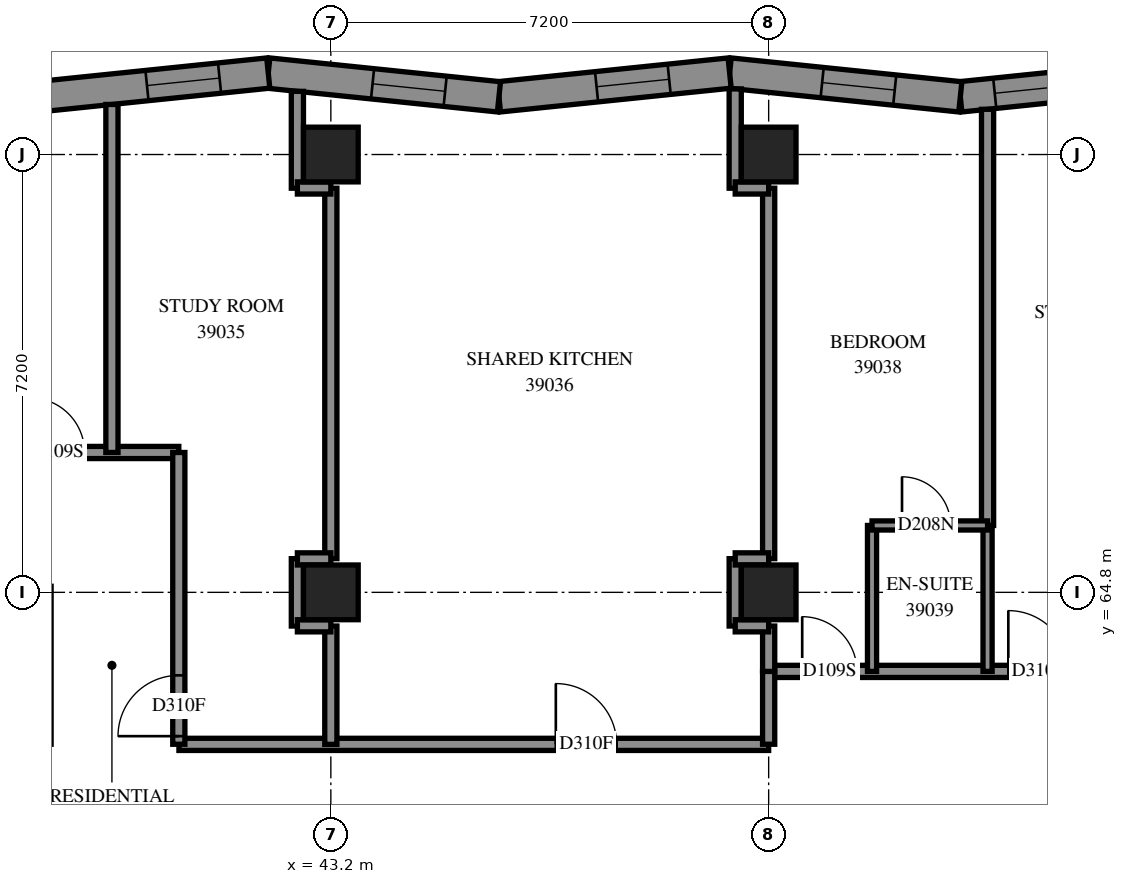
"""IFC4 building model, lengths in metres.
Left out: names, types, materials, properties, quantities, classifications, styles, units other than length and angle.
Written with IfcOpenShell. Run it as: python <this file> out.ifc"""

import sys

from ifc_helpers import new_model, si_unit, direction, frame, frame_2d, origin, origin_2d, place, context, subcontext, project, spatial, polyline, rectangle, outline, extrude, element, fill, save


model = new_model("IFC4")
c1 = context("Model", 3, precision=1e-05, world=origin(), true_north=direction((0.0, 1.0)))
c2 = subcontext(c1, "Body", "Model", "MODEL_VIEW")
j1 = project(units=[si_unit("LENGTHUNIT", "METRE"), si_unit("PLANEANGLEUNIT", "RADIAN")], contexts=[c1])
p1 = place(None, origin())
s1 = spatial("IfcSite", under=j1, at=p1, CompositionType="ELEMENT")
p2 = place(p1, origin())
s2 = spatial("IfcBuilding", under=s1, at=p2, CompositionType="ELEMENT")
p3 = place(p2, frame((0.0, 0.0, 145.6)))
s3 = spatial("IfcBuildingStorey", under=s2, at=p3, CompositionType="ELEMENT", Elevation=145.6)
for number, where, z_axis, x_axis in (
    (1, (43.2, 64.8, 0.0), (0.0, 0.0, 1.0), (1.0, 0.0, 0.0)),
    (2, (43.2, 72.0, 0.0), (0.0, 0.0, 1.0), (1.0, 0.0, 0.0)),
    (3, (50.4, 64.8, 0.0), (0.0, 0.0, 1.0), (1.0, 0.0, 0.0)),
    (4, (50.4, 72.0, 0.0), (0.0, 0.0, 1.0), (1.0, 0.0, 0.0)),
):
    element("IfcColumn", number, at=place(p3, frame(where, z_axis=z_axis, x_axis=x_axis)), inside=s3, PredefinedType="COLUMN", context=c2, shape_type="SweptSolid", body=[
        extrude(rectangle(XDim=0.9, YDim=0.9, at=origin_2d()), origin(), (0.0, 0.0, 1.0), 3.1),
    ])
p4 = place(p3, frame((57.346, 73.34, 0.0), z_axis=(0.0, 0.0, 1.0), x_axis=(-0.9947304076, -0.1025251975, 0.0)))
e5 = element("IfcWall", 5, at=p4, inside=s3, PredefinedType="SOLIDWALL", context=c2, shape_type="SweptSolid", body=[
    extrude(outline(polyline([(-0.026, -0.25), (3.788, -0.25), (3.84, 0.25), (0.026, 0.25), (-0.026, -0.25)])), origin(), (0.0, 0.0, 1.0), 3.1),
])
p5 = place(p4, frame((0.445, 0.0, 0.45)))
e6 = element("IfcOpeningElement", 6, at=p5, cuts=e5, PredefinedType="OPENING", context=c2, shape_type="SweptSolid", body=[
    extrude(rectangle(XDim=2.8, YDim=2.5, at=frame_2d((1.4, 1.25))), frame((0.0, 0.26, 0.0), z_axis=(0.0, -1.0, 0.0), x_axis=(1.0, 0.0, 0.0)), (0.0, 0.0, 1.0), 0.52),
])
p6 = place(p3, frame((53.552, 72.949, 0.0), z_axis=(0.0, 0.0, 1.0), x_axis=(-0.9947306832, 0.1025225234, 0.0)))
e7 = element("IfcWall", 7, at=p6, inside=s3, PredefinedType="SOLIDWALL", context=c2, shape_type="SweptSolid", body=[
    extrude(outline(polyline([(0.026, -0.25), (3.84, -0.25), (3.788, 0.25), (-0.026, 0.25), (0.026, -0.25)])), origin(), (0.0, 0.0, 1.0), 3.1),
])
p7 = place(p6, frame((1.084, 0.0, 0.45)))
e8 = element("IfcOpeningElement", 8, at=p7, cuts=e7, PredefinedType="OPENING", context=c2, shape_type="SweptSolid", body=[
    extrude(rectangle(XDim=1.2, YDim=2.5, at=frame_2d((0.6, 1.25))), frame((0.0, 0.26, 0.0), z_axis=(0.0, -1.0, 0.0), x_axis=(1.0, 0.0, 0.0)), (0.0, 0.0, 1.0), 0.52),
])
p8 = place(p3, frame((49.758, 73.34, 0.0), z_axis=(0.0, 0.0, 1.0), x_axis=(-0.9947306832, -0.1025225234, 0.0)))
e9 = element("IfcWall", 9, at=p8, inside=s3, PredefinedType="SOLIDWALL", context=c2, shape_type="SweptSolid", body=[
    extrude(outline(polyline([(-0.026, -0.25), (3.788, -0.25), (3.84, 0.25), (0.026, 0.25), (-0.026, -0.25)])), origin(), (0.0, 0.0, 1.0), 3.1),
])
p9 = place(p8, frame((1.0, 0.0, 0.45)))
e10 = element("IfcOpeningElement", 10, at=p9, cuts=e9, PredefinedType="OPENING", context=c2, shape_type="SweptSolid", body=[
    extrude(rectangle(XDim=1.2, YDim=2.5, at=frame_2d((0.6, 1.25))), frame((0.0, 0.26, 0.0), z_axis=(0.0, -1.0, 0.0), x_axis=(1.0, 0.0, 0.0)), (0.0, 0.0, 1.0), 0.52),
])
p10 = place(p3, frame((45.965, 72.949, 0.0), z_axis=(0.0, 0.0, 1.0), x_axis=(-0.9947304076, 0.1025251975, 0.0)))
e11 = element("IfcWall", 11, at=p10, inside=s3, PredefinedType="SOLIDWALL", context=c2, shape_type="SweptSolid", body=[
    extrude(outline(polyline([(0.026, -0.25), (3.84, -0.25), (3.788, 0.25), (-0.026, 0.25), (0.026, -0.25)])), origin(), (0.0, 0.0, 1.0), 3.1),
])
p11 = place(p10, frame((0.89, 0.0, 0.45)))
e12 = element("IfcOpeningElement", 12, at=p11, cuts=e11, PredefinedType="OPENING", context=c2, shape_type="SweptSolid", body=[
    extrude(rectangle(XDim=1.2, YDim=2.5, at=frame_2d((0.6, 1.25))), frame((0.0, 0.26, 0.0), z_axis=(0.0, -1.0, 0.0), x_axis=(1.0, 0.0, 0.0)), (0.0, 0.0, 1.0), 0.52),
])
p12 = place(p3, frame((42.171, 73.34, 0.0), z_axis=(0.0, 0.0, 1.0), x_axis=(-0.9947306832, -0.1025225234, 0.0)))
e13 = element("IfcWall", 13, at=p12, inside=s3, PredefinedType="SOLIDWALL", context=c2, shape_type="SweptSolid", body=[
    extrude(outline(polyline([(-0.026, -0.25), (3.788, -0.25), (3.84, 0.25), (0.026, 0.25), (-0.026, -0.25)])), origin(), (0.0, 0.0, 1.0), 3.1),
])
p13 = place(p12, frame((0.805, 0.0, 0.45)))
e14 = element("IfcOpeningElement", 14, at=p13, cuts=e13, PredefinedType="OPENING", context=c2, shape_type="SweptSolid", body=[
    extrude(rectangle(XDim=1.2, YDim=2.5, at=frame_2d((0.6, 1.25))), frame((0.0, 0.26, 0.0), z_axis=(0.0, -1.0, 0.0), x_axis=(1.0, 0.0, 0.0)), (0.0, 0.0, 1.0), 0.52),
])
p14 = place(p3, frame((21.602, 67.1, 0.0), z_axis=(0.0, 0.0, 1.0), x_axis=(1.0, 0.0, 0.0)))
e15 = element("IfcWall", 15, at=p14, inside=s3, PredefinedType="PARTITIONING", context=c2, shape_type="SweptSolid", body=[
    extrude(rectangle(XDim=19.098, YDim=0.2, at=frame_2d((9.549, 0.0))), origin(), (0.0, 0.0, 1.0), 3.1),
])
p15 = place(p14, frame((3.998, 0.0, 0.0)))
e16 = element("IfcOpeningElement", 16, at=p15, cuts=e15, PredefinedType="OPENING", context=c2, shape_type="SweptSolid", body=[
    extrude(rectangle(XDim=0.9, YDim=2.1, at=frame_2d((0.45, 1.05))), frame((0.0, 0.11, 0.0), z_axis=(0.0, -1.0, 0.0), x_axis=(1.0, 0.0, 0.0)), (0.0, 0.0, 1.0), 0.22),
])
p16 = place(p14, frame((11.399, 0.0, 0.0)))
e17 = element("IfcOpeningElement", 17, at=p16, cuts=e15, PredefinedType="OPENING", context=c2, shape_type="SweptSolid", body=[
    extrude(rectangle(XDim=0.9, YDim=2.1, at=frame_2d((0.45, 1.05))), frame((0.0, 0.11, 0.0), z_axis=(0.0, -1.0, 0.0), x_axis=(1.0, 0.0, 0.0)), (0.0, 0.0, 1.0), 0.22),
])
p17 = place(p14, frame((16.648, 0.0, 0.0)))
e18 = element("IfcOpeningElement", 18, at=p17, cuts=e15, PredefinedType="OPENING", context=c2, shape_type="SweptSolid", body=[
    extrude(rectangle(XDim=0.9, YDim=2.1, at=frame_2d((0.45, 1.05))), frame((0.0, 0.11, 0.0), z_axis=(0.0, -1.0, 0.0), x_axis=(1.0, 0.0, 0.0)), (0.0, 0.0, 1.0), 0.22),
])
p18 = place(p3, frame((40.702, 62.3, 0.0), z_axis=(0.0, 0.0, 1.0), x_axis=(1.0, 0.0, 0.0)))
e19 = element("IfcWall", 19, at=p18, inside=s3, PredefinedType="PARTITIONING", context=c2, shape_type="SweptSolid", body=[
    extrude(rectangle(XDim=9.698, YDim=0.2, at=frame_2d((4.849, 0.0))), origin(), (0.0, 0.0, 1.0), 3.1),
])
p19 = place(p18, frame((6.198, 0.0, 0.0)))
e20 = element("IfcOpeningElement", 20, at=p19, cuts=e19, PredefinedType="OPENING", context=c2, shape_type="SweptSolid", body=[
    extrude(rectangle(XDim=1.0, YDim=2.1, at=frame_2d((0.5, 1.05))), frame((0.0, 0.11, 0.0), z_axis=(0.0, -1.0, 0.0), x_axis=(1.0, 0.0, 0.0)), (0.0, 0.0, 1.0), 0.22),
])
p20 = place(p3, frame((54.0, 65.9, 0.0), z_axis=(0.0, 0.0, 1.0), x_axis=(0.0, 1.0, 0.0)))
e21 = element("IfcWall", 21, at=p20, inside=s3, PredefinedType="PARTITIONING", context=c2, shape_type="SweptSolid", body=[
    extrude(rectangle(XDim=6.843, YDim=0.2, at=frame_2d((3.422, 0.0))), origin(), (0.0, 0.0, 1.0), 3.1),
])
for number, where, z_axis, x_axis in (
    (22, (43.2, 65.354, 0.0), (0.0, 0.0, 1.0), (0.0, 1.0, 0.0)),
    (23, (50.4, 65.354, 0.0), (0.0, 0.0, 1.0), (0.0, 1.0, 0.0)),
):
    element("IfcWall", number, at=place(p3, frame(where, z_axis=z_axis, x_axis=x_axis)), inside=s3, PredefinedType="PARTITIONING", context=c2, shape_type="SweptSolid", body=[
        extrude(rectangle(XDim=6.092, YDim=0.2, at=frame_2d((3.046, 0.0))), origin(), (0.0, 0.0, 1.0), 3.1),
    ])
p21 = place(p3, frame((39.6, 67.1, 0.0), z_axis=(0.0, 0.0, 1.0), x_axis=(0.0, 1.0, 0.0)))
e24 = element("IfcWall", 24, at=p21, inside=s3, PredefinedType="PARTITIONING", context=c2, shape_type="SweptSolid", body=[
    extrude(rectangle(XDim=5.723, YDim=0.2, at=frame_2d((2.862, 0.0))), origin(), (0.0, 0.0, 1.0), 3.1),
])
p22 = place(p3, frame((50.4, 63.5, 0.0), z_axis=(0.0, 0.0, 1.0), x_axis=(1.0, 0.0, 0.0)))
e25 = element("IfcWall", 25, at=p22, inside=s3, PredefinedType="PARTITIONING", context=c2, shape_type="SweptSolid", body=[
    extrude(rectangle(XDim=5.1, YDim=0.2, at=frame_2d((2.55, 0.0))), origin(), (0.0, 0.0, 1.0), 3.1),
])
p23 = place(p22, frame((0.552, 0.0, 0.0)))
e26 = element("IfcOpeningElement", 26, at=p23, cuts=e25, PredefinedType="OPENING", context=c2, shape_type="SweptSolid", body=[
    extrude(rectangle(XDim=0.9, YDim=2.1, at=frame_2d((0.45, 1.05))), frame((0.0, 0.11, 0.0), z_axis=(0.0, -1.0, 0.0), x_axis=(1.0, 0.0, 0.0)), (0.0, 0.0, 1.0), 0.22),
])
p24 = place(p22, frame((3.941, 0.0, 0.0)))
e27 = element("IfcOpeningElement", 27, at=p24, cuts=e25, PredefinedType="OPENING", context=c2, shape_type="SweptSolid", body=[
    extrude(rectangle(XDim=1.0, YDim=2.1, at=frame_2d((0.5, 1.05))), frame((0.0, 0.11, 0.0), z_axis=(0.0, -1.0, 0.0), x_axis=(1.0, 0.0, 0.0)), (0.0, 0.0, 1.0), 0.22),
])
p25 = place(p3, frame((40.7, 62.302, 0.0), z_axis=(0.0, 0.0, 1.0), x_axis=(0.0, 1.0, 0.0)))
e28 = element("IfcWall", 28, at=p25, inside=s3, PredefinedType="PARTITIONING", context=c2, shape_type="SweptSolid", body=[
    extrude(rectangle(XDim=4.798, YDim=0.2, at=frame_2d((2.399, 0.0))), origin(), (0.0, 0.0, 1.0), 3.1),
])
p26 = place(p25, frame((0.133, 0.0, 0.0)))
e29 = element("IfcOpeningElement", 29, at=p26, cuts=e28, PredefinedType="OPENING", context=c2, shape_type="SweptSolid", body=[
    extrude(rectangle(XDim=1.0, YDim=2.1, at=frame_2d((0.5, 1.05))), frame((0.0, 0.11, 0.0), z_axis=(0.0, -1.0, 0.0), x_axis=(1.0, 0.0, 0.0)), (0.0, 0.0, 1.0), 0.22),
])
for number, where, z_axis, x_axis in (
    (30, (52.1, 63.5, 0.0), (0.0, 0.0, 1.0), (0.0, 1.0, 0.0)),
    (31, (54.0, 63.5, 0.0), (0.0, 0.0, 1.0), (0.0, 1.0, 0.0)),
):
    element("IfcWall", number, at=place(p3, frame(where, z_axis=z_axis, x_axis=x_axis)), inside=s3, PredefinedType="PARTITIONING", context=c2, shape_type="SweptSolid", body=[
        extrude(rectangle(XDim=2.4, YDim=0.15, at=frame_2d((1.2, 0.0))), origin(), (0.0, 0.0, 1.0), 3.1),
    ])
p27 = place(p3, frame((43.2, 62.3, 0.0), z_axis=(0.0, 0.0, 1.0), x_axis=(0.0, 1.0, 0.0)))
e32 = element("IfcWall", 32, at=p27, inside=s3, PredefinedType="PARTITIONING", context=c2, shape_type="SweptSolid", body=[
    extrude(rectangle(XDim=1.946, YDim=0.2, at=frame_2d((0.973, 0.0))), origin(), (0.0, 0.0, 1.0), 3.1),
])
p28 = place(p3, frame((52.1, 65.9, 0.0), z_axis=(0.0, 0.0, 1.0), x_axis=(1.0, 0.0, 0.0)))
e33 = element("IfcWall", 33, at=p28, inside=s3, PredefinedType="PARTITIONING", context=c2, shape_type="SweptSolid", body=[
    extrude(rectangle(XDim=1.9, YDim=0.15, at=frame_2d((0.95, 0.0))), origin(), (0.0, 0.0, 1.0), 3.1),
])
p29 = place(p28, frame((0.493, 0.0, 0.0)))
e34 = element("IfcOpeningElement", 34, at=p29, cuts=e33, PredefinedType="OPENING", context=c2, shape_type="SweptSolid", body=[
    extrude(rectangle(XDim=0.8, YDim=2.1, at=frame_2d((0.4, 1.05))), frame((0.0, 0.085, 0.0), z_axis=(0.0, -1.0, 0.0), x_axis=(1.0, 0.0, 0.0)), (0.0, 0.0, 1.0), 0.17),
])
p30 = place(p3, frame((49.85, 71.446, 0.0), z_axis=(0.0, 0.0, 1.0), x_axis=(0.0, 1.0, 0.0)))
e35 = element("IfcWall", 35, at=p30, inside=s3, PredefinedType="PARTITIONING", context=c2, shape_type="SweptSolid", body=[
    extrude(rectangle(XDim=1.633, YDim=0.2, at=frame_2d((0.817, 0.0))), origin(), (0.0, 0.0, 1.0), 3.1),
])
p31 = place(p3, frame((42.65, 71.446, 0.0), z_axis=(0.0, 0.0, 1.0), x_axis=(0.0, 1.0, 0.0)))
e36 = element("IfcWall", 36, at=p31, inside=s3, PredefinedType="PARTITIONING", context=c2, shape_type="SweptSolid", body=[
    extrude(rectangle(XDim=1.593, YDim=0.2, at=frame_2d((0.796, 0.0))), origin(), (0.0, 0.0, 1.0), 3.1),
])
p32 = place(p3, frame((50.4, 62.302, 0.0), z_axis=(0.0, 0.0, 1.0), x_axis=(0.0, 1.0, 0.0)))
e37 = element("IfcWall", 37, at=p32, inside=s3, PredefinedType="PARTITIONING", context=c2, shape_type="SweptSolid", body=[
    extrude(rectangle(XDim=1.198, YDim=0.2, at=frame_2d((0.599, 0.0))), origin(), (0.0, 0.0, 1.0), 3.1),
])
for number, where, z_axis, x_axis in (
    (38, (42.65, 64.246, 0.0), (0.0, 0.0, 1.0), (0.0, 1.0, 0.0)),
    (39, (49.85, 64.246, 0.0), (0.0, 0.0, 1.0), (0.0, 1.0, 0.0)),
):
    element("IfcWall", number, at=place(p3, frame(where, z_axis=z_axis, x_axis=x_axis)), inside=s3, PredefinedType="PARTITIONING", context=c2, shape_type="SweptSolid", body=[
        extrude(rectangle(XDim=1.108, YDim=0.2, at=frame_2d((0.554, 0.0))), origin(), (0.0, 0.0, 1.0), 3.1),
    ])
p33 = place(p3, frame((50.4, 63.5, 0.0), z_axis=(0.0, 0.0, 1.0), x_axis=(0.0, 1.0, 0.0)))
e40 = element("IfcWall", 40, at=p33, inside=s3, PredefinedType="PARTITIONING", context=c2, shape_type="SweptSolid", body=[
    extrude(rectangle(XDim=0.746, YDim=0.2, at=frame_2d((0.373, 0.0))), origin(), (0.0, 0.0, 1.0), 3.1),
])
for number, where, z_axis, x_axis in (
    (41, (42.65, 71.45, 0.0), (0.0, 0.0, 1.0), (1.0, 0.0, 0.0)),
    (42, (42.65, 65.35, 0.0), (0.0, 0.0, 1.0), (1.0, 0.0, 0.0)),
    (43, (42.65, 64.25, 0.0), (0.0, 0.0, 1.0), (1.0, 0.0, 0.0)),
    (44, (49.85, 71.45, 0.0), (0.0, 0.0, 1.0), (1.0, 0.0, 0.0)),
    (45, (49.85, 65.35, 0.0), (0.0, 0.0, 1.0), (1.0, 0.0, 0.0)),
    (46, (49.85, 64.25, 0.0), (0.0, 0.0, 1.0), (1.0, 0.0, 0.0)),
):
    element("IfcWall", number, at=place(p3, frame(where, z_axis=z_axis, x_axis=x_axis)), inside=s3, PredefinedType="PARTITIONING", context=c2, shape_type="SweptSolid", body=[
        extrude(rectangle(XDim=0.55, YDim=0.2, at=frame_2d((0.275, 0.0))), origin(), (0.0, 0.0, 1.0), 3.1),
    ])
p34 = place(p5, origin())
e47 = element("IfcWindow", 47, at=p34, inside=s3, PartitioningType="SINGLE_PANEL", PredefinedType="WINDOW", context=c2, shape_type="SweptSolid", body=[
    extrude(rectangle(XDim=2.8, YDim=2.5, at=frame_2d((1.4, 1.25))), frame((0.0, 0.18, 0.0), z_axis=(0.0, -1.0, 0.0), x_axis=(1.0, 0.0, 0.0)), (0.0, 0.0, 1.0), 0.06),
])
fill(e6, e47)
p35 = place(p7, origin())
e48 = element("IfcWindow", 48, at=p35, inside=s3, PartitioningType="SINGLE_PANEL", PredefinedType="WINDOW", context=c2, shape_type="SweptSolid", body=[
    extrude(rectangle(XDim=1.2, YDim=2.5, at=frame_2d((0.6, 1.25))), frame((0.0, 0.18, 0.0), z_axis=(0.0, -1.0, 0.0), x_axis=(1.0, 0.0, 0.0)), (0.0, 0.0, 1.0), 0.06),
])
fill(e8, e48)
p36 = place(p9, origin())
e49 = element("IfcWindow", 49, at=p36, inside=s3, PartitioningType="SINGLE_PANEL", PredefinedType="WINDOW", context=c2, shape_type="SweptSolid", body=[
    extrude(rectangle(XDim=1.2, YDim=2.5, at=frame_2d((0.6, 1.25))), frame((0.0, 0.18, 0.0), z_axis=(0.0, -1.0, 0.0), x_axis=(1.0, 0.0, 0.0)), (0.0, 0.0, 1.0), 0.06),
])
fill(e10, e49)
p37 = place(p11, origin())
e50 = element("IfcWindow", 50, at=p37, inside=s3, PartitioningType="SINGLE_PANEL", PredefinedType="WINDOW", context=c2, shape_type="SweptSolid", body=[
    extrude(rectangle(XDim=1.2, YDim=2.5, at=frame_2d((0.6, 1.25))), frame((0.0, 0.18, 0.0), z_axis=(0.0, -1.0, 0.0), x_axis=(1.0, 0.0, 0.0)), (0.0, 0.0, 1.0), 0.06),
])
fill(e12, e50)
p38 = place(p13, origin())
e51 = element("IfcWindow", 51, at=p38, inside=s3, PartitioningType="SINGLE_PANEL", PredefinedType="WINDOW", context=c2, shape_type="SweptSolid", body=[
    extrude(rectangle(XDim=1.2, YDim=2.5, at=frame_2d((0.6, 1.25))), frame((0.0, 0.18, 0.0), z_axis=(0.0, -1.0, 0.0), x_axis=(1.0, 0.0, 0.0)), (0.0, 0.0, 1.0), 0.06),
])
fill(e14, e51)
p39 = place(p17, origin())
e52 = element("IfcDoor", 52, at=p39, inside=s3, OperationType="SINGLE_SWING_RIGHT", PredefinedType="DOOR", context=c2, shape_type="SweptSolid", body=[
    extrude(rectangle(XDim=0.9, YDim=2.1, at=frame_2d((0.45, 1.05))), frame((0.0, 0.025, 0.0), z_axis=(0.0, -1.0, 0.0), x_axis=(1.0, 0.0, 0.0)), (0.0, 0.0, 1.0), 0.05),
])
fill(e18, e52)
p40 = place(p26, origin())
e53 = element("IfcDoor", 53, at=p40, inside=s3, OperationType="SINGLE_SWING_LEFT", PredefinedType="DOOR", context=c2, shape_type="SweptSolid", body=[
    extrude(rectangle(XDim=1.0, YDim=2.1, at=frame_2d((0.5, 1.05))), frame((0.0, 0.025, 0.0), z_axis=(0.0, -1.0, 0.0), x_axis=(1.0, 0.0, 0.0)), (0.0, 0.0, 1.0), 0.05),
])
fill(e29, e53)
p41 = place(p19, origin())
e54 = element("IfcDoor", 54, at=p41, inside=s3, OperationType="SINGLE_SWING_RIGHT", PredefinedType="DOOR", context=c2, shape_type="SweptSolid", body=[
    extrude(rectangle(XDim=1.0, YDim=2.1, at=frame_2d((0.5, 1.05))), frame((0.0, 0.025, 0.0), z_axis=(0.0, -1.0, 0.0), x_axis=(1.0, 0.0, 0.0)), (0.0, 0.0, 1.0), 0.05),
])
fill(e20, e54)
p42 = place(p23, origin())
e55 = element("IfcDoor", 55, at=p42, inside=s3, OperationType="SINGLE_SWING_RIGHT", PredefinedType="DOOR", context=c2, shape_type="SweptSolid", body=[
    extrude(rectangle(XDim=0.9, YDim=2.1, at=frame_2d((0.45, 1.05))), frame((0.0, 0.025, 0.0), z_axis=(0.0, -1.0, 0.0), x_axis=(1.0, 0.0, 0.0)), (0.0, 0.0, 1.0), 0.05),
])
fill(e26, e55)
p43 = place(p29, origin())
e56 = element("IfcDoor", 56, at=p43, inside=s3, OperationType="SINGLE_SWING_RIGHT", PredefinedType="DOOR", context=c2, shape_type="SweptSolid", body=[
    extrude(rectangle(XDim=0.8, YDim=2.1, at=frame_2d((0.4, 1.05))), frame((0.0, 0.025, 0.0), z_axis=(0.0, -1.0, 0.0), x_axis=(1.0, 0.0, 0.0)), (0.0, 0.0, 1.0), 0.05),
])
fill(e34, e56)
p44 = place(p24, origin())
e57 = element("IfcDoor", 57, at=p44, inside=s3, OperationType="SINGLE_SWING_LEFT", PredefinedType="DOOR", context=c2, shape_type="SweptSolid", body=[
    extrude(rectangle(XDim=1.0, YDim=2.1, at=frame_2d((0.5, 1.05))), frame((0.0, 0.025, 0.0), z_axis=(0.0, -1.0, 0.0), x_axis=(1.0, 0.0, 0.0)), (0.0, 0.0, 1.0), 0.05),
])
fill(e27, e57)
save(model, sys.argv[1])
